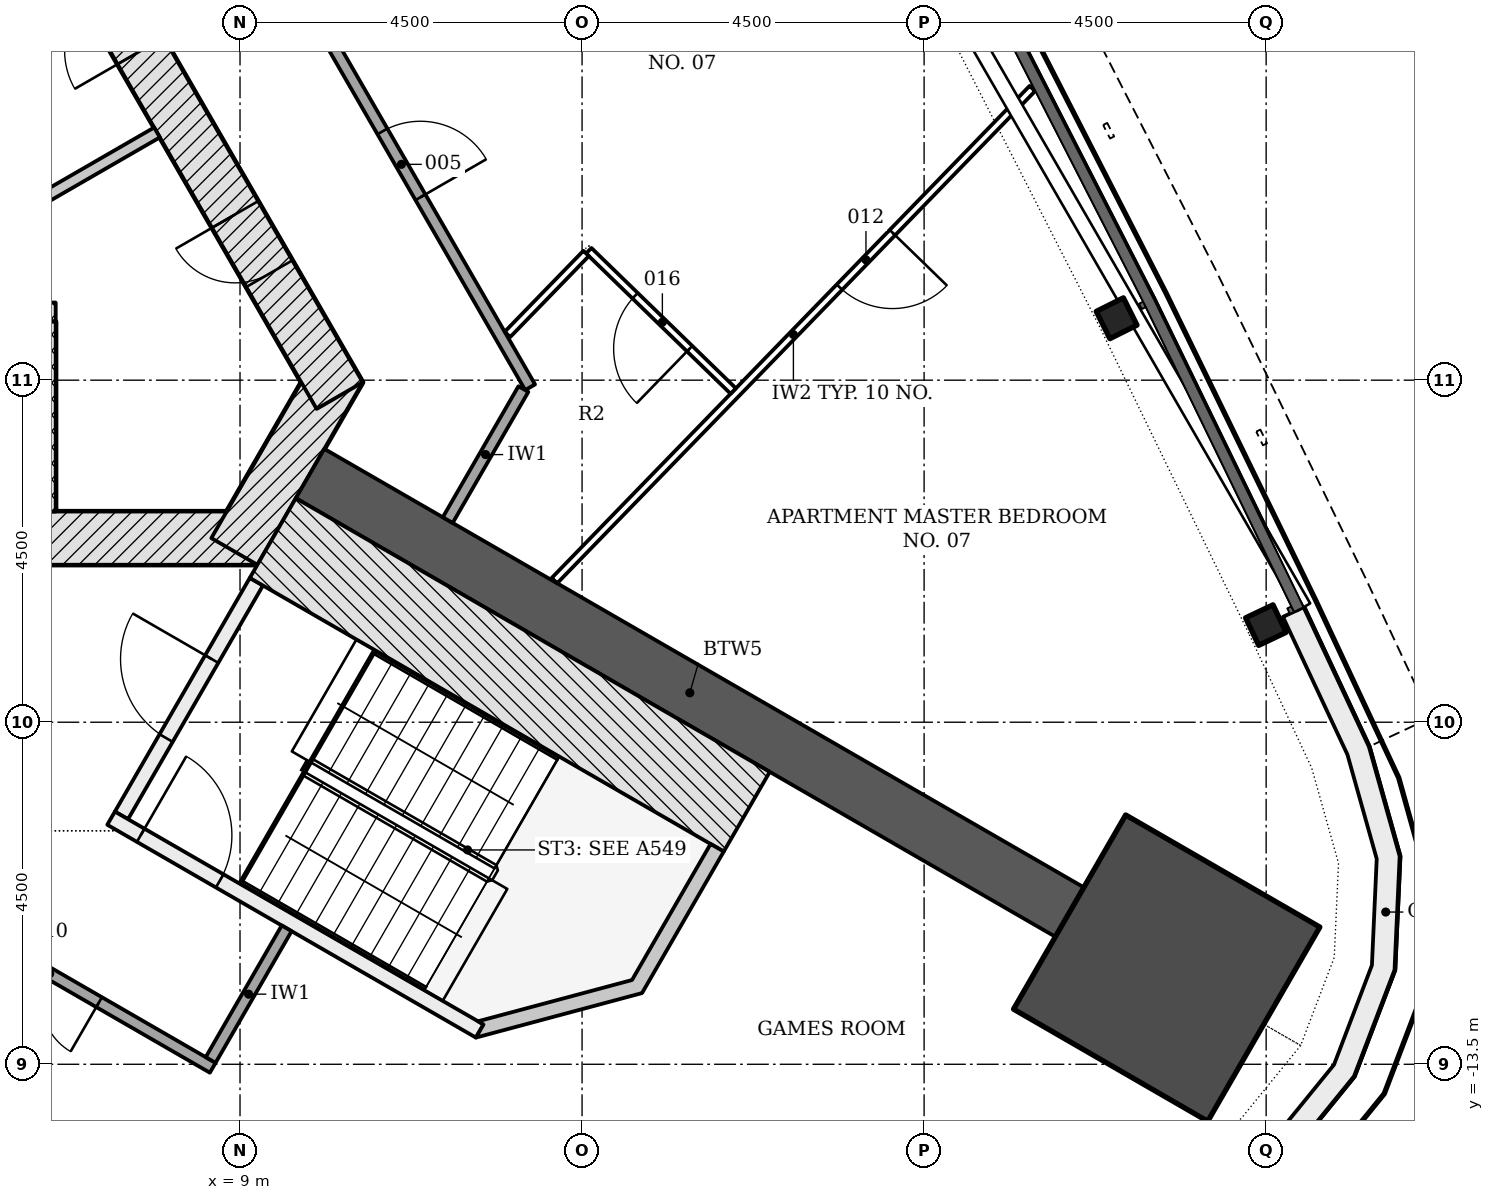
"""IFC4 building model, lengths in metres.
Left out: names, types, materials, properties, quantities, classifications, styles, units other than length and angle.
Written with IfcOpenShell. Run it as: python <this file> out.ifc"""

import sys

from ifc_helpers import new_model, si_unit, direction, frame, frame_2d, origin, origin_2d, place, context, subcontext, project, spatial, polyline, rectangle, i_section, outline, extrude, element, fill, save


model = new_model("IFC4")
c1 = context("Model", 3, precision=1e-05, world=origin(), true_north=direction((0.0, 1.0)))
c2 = subcontext(c1, "Body", "Model", "MODEL_VIEW")
j1 = project(units=[si_unit("LENGTHUNIT", "METRE"), si_unit("PLANEANGLEUNIT", "RADIAN")], contexts=[c1])
p1 = place(None, origin())
s1 = spatial("IfcSite", under=j1, at=p1, CompositionType="ELEMENT")
p2 = place(p1, origin())
s2 = spatial("IfcBuilding", under=s1, at=p2, CompositionType="ELEMENT")
p3 = place(p2, frame((0.0, 0.0, 116.7)))
s3 = spatial("IfcBuildingStorey", under=s2, at=p3, CompositionType="ELEMENT", Elevation=116.7)
p4 = place(p3, frame((-9.229, -6.578, -0.2), z_axis=(0.0, 0.0, 1.0), x_axis=(1.0, 0.0, 0.0)))
e1 = element("IfcWall", 1, at=p4, inside=s3, PredefinedType="SHEAR", context=c2, shape_type="SweptSolid", body=[
    extrude(rectangle(XDim=18.458, YDim=0.7, at=frame_2d((9.229, 0.0))), origin(), (0.0, 0.0, 1.0), 3.6),
])
p5 = place(p4, frame((3.304, 0.0, 0.2)))
e2 = element("IfcOpeningElement", 2, at=p5, cuts=e1, PredefinedType="OPENING", context=c2, shape_type="SweptSolid", body=[
    extrude(rectangle(XDim=1.1, YDim=2.1, at=frame_2d((0.55, 1.05))), frame((0.0, 0.36, 0.0), z_axis=(0.0, -1.0, 0.0), x_axis=(1.0, 0.0, 0.0)), (0.0, 0.0, 1.0), 0.72),
])
p6 = place(p4, frame((5.454, 0.0, 0.2)))
e3 = element("IfcOpeningElement", 3, at=p6, cuts=e1, PredefinedType="OPENING", context=c2, shape_type="SweptSolid", body=[
    extrude(rectangle(XDim=1.1, YDim=2.1, at=frame_2d((0.55, 1.05))), frame((0.0, 0.36, 0.0), z_axis=(0.0, -1.0, 0.0), x_axis=(1.0, 0.0, 0.0)), (0.0, 0.0, 1.0), 0.72),
])
p7 = place(p4, frame((7.604, 0.0, 0.2)))
e4 = element("IfcOpeningElement", 4, at=p7, cuts=e1, PredefinedType="OPENING", context=c2, shape_type="SweptSolid", body=[
    extrude(rectangle(XDim=1.1, YDim=2.1, at=frame_2d((0.55, 1.05))), frame((0.0, 0.36, 0.0), z_axis=(0.0, -1.0, 0.0), x_axis=(1.0, 0.0, 0.0)), (0.0, 0.0, 1.0), 0.72),
])
p8 = place(p4, frame((9.754, 0.0, 0.2)))
e5 = element("IfcOpeningElement", 5, at=p8, cuts=e1, PredefinedType="OPENING", context=c2, shape_type="SweptSolid", body=[
    extrude(rectangle(XDim=1.1, YDim=2.1, at=frame_2d((0.55, 1.05))), frame((0.0, 0.36, 0.0), z_axis=(0.0, -1.0, 0.0), x_axis=(1.0, 0.0, 0.0)), (0.0, 0.0, 1.0), 0.72),
])
p9 = place(p4, frame((11.904, 0.0, 0.2)))
e6 = element("IfcOpeningElement", 6, at=p9, cuts=e1, PredefinedType="OPENING", context=c2, shape_type="SweptSolid", body=[
    extrude(rectangle(XDim=1.1, YDim=2.1, at=frame_2d((0.55, 1.05))), frame((0.0, 0.36, 0.0), z_axis=(0.0, -1.0, 0.0), x_axis=(1.0, 0.0, 0.0)), (0.0, 0.0, 1.0), 0.72),
])
p10 = place(p4, frame((14.054, 0.0, 0.2)))
e7 = element("IfcOpeningElement", 7, at=p10, cuts=e1, PredefinedType="OPENING", context=c2, shape_type="SweptSolid", body=[
    extrude(rectangle(XDim=1.1, YDim=2.1, at=frame_2d((0.55, 1.05))), frame((0.0, 0.36, 0.0), z_axis=(0.0, -1.0, 0.0), x_axis=(1.0, 0.0, 0.0)), (0.0, 0.0, 1.0), 0.72),
])
p11 = place(p4, frame((0.926, 0.0, 0.2)))
e8 = element("IfcOpeningElement", 8, at=p11, cuts=e1, PredefinedType="OPENING", context=c2, shape_type="SweptSolid", body=[
    extrude(rectangle(XDim=0.9, YDim=2.1, at=frame_2d((0.45, 1.05))), frame((0.0, 0.36, 0.0), z_axis=(0.0, -1.0, 0.0), x_axis=(1.0, 0.0, 0.0)), (0.0, 0.0, 1.0), 0.72),
])
p12 = place(p3, frame((8.926, -6.753, -0.2), z_axis=(0.0, 0.0, 1.0), x_axis=(0.500042739161, 0.866000726912, 0.0)))
e9 = element("IfcWall", 9, at=p12, inside=s3, PredefinedType="SHEAR", context=c2, shape_type="SweptSolid", body=[
    extrude(rectangle(XDim=2.771, YDim=0.7, at=frame_2d((1.386, 0.0))), origin(), (0.0, 0.0, 1.0), 3.6),
])
p13 = place(p3, frame((10.311, -4.703, -0.2), z_axis=(0.0, 0.0, 1.0), x_axis=(-0.500001446645, 0.866024568562, 0.0)))
e10 = element("IfcWall", 10, at=p13, inside=s3, PredefinedType="SHEAR", context=c2, shape_type="SweptSolid", body=[
    extrude(rectangle(XDim=18.458, YDim=0.7, at=frame_2d((9.229, 0.0))), origin(), (0.0, 0.0, 1.0), 3.6),
])
p14 = place(p13, frame((7.5, 0.0, 0.2)))
e11 = element("IfcOpeningElement", 11, at=p14, cuts=e10, PredefinedType="OPENING", context=c2, shape_type="SweptSolid", body=[
    extrude(rectangle(XDim=1.0, YDim=2.1, at=frame_2d((0.5, 1.05))), frame((0.0, 0.36, 0.0), z_axis=(0.0, -1.0, 0.0), x_axis=(1.0, 0.0, 0.0)), (0.0, 0.0, 1.0), 0.72),
])
p15 = place(p13, frame((1.852, 0.0, 0.2)))
e12 = element("IfcOpeningElement", 12, at=p15, cuts=e10, PredefinedType="OPENING", context=c2, shape_type="SweptSolid", body=[
    extrude(rectangle(XDim=0.9, YDim=2.1, at=frame_2d((0.45, 1.05))), frame((0.0, 0.36, 0.0), z_axis=(0.0, -1.0, 0.0), x_axis=(1.0, 0.0, 0.0)), (0.0, 0.0, 1.0), 0.72),
])
p16 = place(p13, frame((5.238, 0.0, 0.2)))
e13 = element("IfcOpeningElement", 13, at=p16, cuts=e10, PredefinedType="OPENING", context=c2, shape_type="SweptSolid", body=[
    extrude(rectangle(XDim=1.0, YDim=2.1, at=frame_2d((0.5, 1.05))), frame((0.0, 0.36, 0.0), z_axis=(0.0, -1.0, 0.0), x_axis=(1.0, 0.0, 0.0)), (0.0, 0.0, 1.0), 0.72),
])
p17 = place(p13, frame((13.63, 0.0, 0.2)))
e14 = element("IfcOpeningElement", 14, at=p17, cuts=e10, PredefinedType="OPENING", context=c2, shape_type="SweptSolid", body=[
    extrude(rectangle(XDim=0.9, YDim=2.1, at=frame_2d((0.45, 1.05))), frame((0.0, 0.36, 0.0), z_axis=(0.0, -1.0, 0.0), x_axis=(1.0, 0.0, 0.0)), (0.0, 0.0, 1.0), 0.72),
])
p18 = place(p3, frame((9.922, -5.728, -0.2), z_axis=(0.0, 0.0, 1.0), x_axis=(0.866024913782, -0.500000848707, 0.0)))
e15 = element("IfcWall", 15, at=p18, inside=s3, PredefinedType="SHEAR", context=c2, shape_type="SweptSolid", body=[
    extrude(rectangle(XDim=11.539, YDim=0.75, at=frame_2d((5.769, 0.0))), origin(), (0.0, 0.0, 1.0), 3.6),
])
p19 = place(p3, frame((21.192, -12.235, -0.2), z_axis=(0.0, 0.0, 1.0), x_axis=(0.866025403784, -0.5, 0.0)))
e16 = element("IfcColumn", 16, at=p19, inside=s3, PredefinedType="COLUMN", context=c2, shape_type="SweptSolid", body=[
    extrude(rectangle(XDim=2.95, YDim=2.95, at=origin_2d()), origin(), (0.0, 0.0, 1.0), 3.6),
])
for number, where, z_axis, x_axis in (
    (17, (22.496, -7.722, -0.2), (0.0, 0.0, 1.0), (-0.428, 0.904, 0.0)),
    (18, (20.533, -3.686, -0.2), (0.0, 0.0, 1.0), (-0.446, 0.895, 0.0)),
):
    element("IfcColumn", number, at=place(p3, frame(where, z_axis=z_axis, x_axis=x_axis)), inside=s3, PredefinedType="COLUMN", context=c2, shape_type="SweptSolid", body=[
        extrude(i_section(OverallWidth=0.401, OverallDepth=0.399, WebThickness=0.025, FlangeThickness=0.04, FilletRadius=0.015, at=origin_2d()), origin(), (0.0, 0.0, 1.0), 3.6),
    ])
p20 = place(p3, origin())
e19 = element("IfcWall", 19, at=p20, inside=s3, PredefinedType="NOTDEFINED", context=c2, shape_type="SweptSolid", body=[
    extrude(outline(polyline([(17.98, -16.169), (19.999, -15.995), (21.449, -15.625), (22.711, -14.819), (23.656, -13.658), (24.189, -12.259), (24.257, -10.763), (23.852, -9.322), (22.993, -7.487), (22.721, -7.614), (23.57, -9.426), (23.955, -10.798), (23.891, -12.197), (23.393, -13.506), (22.509, -14.592), (21.328, -15.347), (19.948, -15.699), (17.955, -15.87), (17.98, -16.169)])), origin(), (0.0, 0.0, 1.0), 3.3),
])
p21 = place(p3, frame((6.45, -6.228, -0.2), z_axis=(0.0, 0.0, 1.0), x_axis=(0.0, 1.0, 0.0)))
e20 = element("IfcWall", 20, at=p21, inside=s3, PredefinedType="PARTITIONING", context=c2, shape_type="SweptSolid", body=[
    extrude(rectangle(XDim=2.5, YDim=0.25, at=frame_2d((1.25, 0.0))), origin(), (0.0, 0.0, 1.0), 3.6),
])
p22 = place(p3, frame((-6.575, -3.603, 0.0), z_axis=(0.0, 0.0, 1.0), x_axis=(1.0, 0.0, 0.0)))
e21 = element("IfcWall", 21, at=p22, inside=s3, PredefinedType="PARTITIONING", context=c2, shape_type="SweptSolid", body=[
    extrude(rectangle(XDim=13.15, YDim=0.25, at=frame_2d((6.575, 0.0))), origin(), (0.0, 0.0, 1.0), 3.4),
])
p23 = place(p3, frame((5.375, -2.703, 0.0), z_axis=(0.0, 0.0, 1.0), x_axis=(0.866046596414, 0.499963291492, 0.0)))
e22 = element("IfcWall", 22, at=p23, inside=s3, PredefinedType="PARTITIONING", context=c2, shape_type="SweptSolid", body=[
    extrude(rectangle(XDim=2.925, YDim=0.15, at=frame_2d((1.462, 0.0))), origin(), (0.0, 0.0, 1.0), 3.4),
])
p24 = place(p3, frame((7.44, -10.226, -0.2), z_axis=(0.0, 0.0, 1.0), x_axis=(0.500022077904, 0.866012656725, 0.0)))
e23 = element("IfcWall", 23, at=p24, inside=s3, PredefinedType="SHEAR", context=c2, shape_type="SweptSolid", body=[
    extrude(rectangle(XDim=3.55, YDim=0.2, at=frame_2d((1.775, 0.0))), origin(), (0.0, 0.0, 1.0), 3.6),
])
p25 = place(p24, frame((1.175, 0.0, 0.2)))
e24 = element("IfcOpeningElement", 24, at=p25, cuts=e23, PredefinedType="OPENING", context=c2, shape_type="SweptSolid", body=[
    extrude(rectangle(XDim=1.2, YDim=2.1, at=frame_2d((0.6, 1.05))), frame((0.0, 0.11, 0.0), z_axis=(0.0, -1.0, 0.0), x_axis=(1.0, 0.0, 0.0)), (0.0, 0.0, 1.0), 0.22),
])
p26 = place(p3, frame((7.304, -10.262, -0.2), z_axis=(0.0, 0.0, 1.0), x_axis=(0.866026594901, -0.49999793692, 0.0)))
e25 = element("IfcWall", 25, at=p26, inside=s3, PredefinedType="SHEAR", context=c2, shape_type="SweptSolid", body=[
    extrude(rectangle(XDim=5.6, YDim=0.2, at=frame_2d((2.8, 0.0))), origin(), (0.0, 0.0, 1.0), 3.6),
])
p27 = place(p26, frame((0.45, 0.0, 0.2)))
e26 = element("IfcOpeningElement", 26, at=p27, cuts=e25, PredefinedType="OPENING", context=c2, shape_type="SweptSolid", body=[
    extrude(rectangle(XDim=1.2, YDim=2.1, at=frame_2d((0.6, 1.05))), frame((0.0, 0.11, 0.0), z_axis=(0.0, -1.0, 0.0), x_axis=(1.0, 0.0, 0.0)), (0.0, 0.0, 1.0), 0.22),
])
p28 = place(p3, frame((9.431, -6.577, -0.2), z_axis=(0.0, 0.0, 1.0), x_axis=(0.866018442252, -0.500012057535, 0.0)))
e27 = element("IfcWall", 27, at=p28, inside=s3, PredefinedType="SHEAR", context=c2, shape_type="SweptSolid", body=[
    extrude(rectangle(XDim=7.2, YDim=1.211, at=frame_2d((3.6, 0.0))), origin(), (0.0, 0.0, 1.0), 3.6),
])
p29 = place(p3, frame((0.0, 0.0, -0.2)))
e28 = element("IfcWall", 28, at=p29, inside=s3, PredefinedType="SHEAR", context=c2, shape_type="SweptSolid", body=[
    extrude(outline(polyline([(12.104, -13.149), (14.289, -12.563), (15.364, -10.701), (15.191, -10.601), (14.157, -12.392), (12.132, -12.934), (12.204, -12.976), (12.204, -12.976), (12.204, -12.976), (12.204, -12.976), (12.204, -12.976), (12.204, -12.976), (12.204, -12.976), (12.204, -12.976), (12.204, -12.976), (12.204, -12.976), (12.204, -12.976), (12.204, -12.976), (12.204, -12.976), (12.204, -12.976), (12.204, -12.976), (12.204, -12.976), (12.204, -12.976), (12.104, -13.149)])), origin(), (0.0, 0.0, 1.0), 3.6),
])
p30 = place(p3, frame((5.289, 8.446, 0.0), z_axis=(0.0, 0.0, 1.0), x_axis=(0.499996620721, -0.866027354803, 0.0)))
e29 = element("IfcWall", 29, at=p30, inside=s3, PredefinedType="PARTITIONING", context=c2, shape_type="SweptSolid", body=[
    extrude(rectangle(XDim=15.057, YDim=0.15, at=frame_2d((7.528, 0.0))), origin(), (0.0, 0.0, 1.0), 2.847),
])
p31 = place(p30, frame((11.17, 0.0, 0.0)))
e30 = element("IfcOpeningElement", 30, at=p31, cuts=e29, PredefinedType="OPENING", context=c2, shape_type="SweptSolid", body=[
    extrude(rectangle(XDim=1.0, YDim=2.1, at=frame_2d((0.5, 1.05))), frame((0.0, 0.085, 0.0), z_axis=(0.0, -1.0, 0.0), x_axis=(1.0, 0.0, 0.0)), (0.0, 0.0, 1.0), 0.17),
])
p32 = place(p30, frame((4.736, 0.0, 0.0)))
e31 = element("IfcOpeningElement", 31, at=p32, cuts=e29, PredefinedType="OPENING", context=c2, shape_type="SweptSolid", body=[
    extrude(rectangle(XDim=1.0, YDim=2.1, at=frame_2d((0.5, 1.05))), frame((0.0, 0.085, 0.0), z_axis=(0.0, -1.0, 0.0), x_axis=(1.0, 0.0, 0.0)), (0.0, 0.0, 1.0), 0.17),
])
p33 = place(p3, frame((8.641, -13.546, 0.0), z_axis=(0.0, 0.0, 1.0), x_axis=(-0.866042728627, 0.499969991291, 0.0)))
e32 = element("IfcWall", 32, at=p33, inside=s3, PredefinedType="PARTITIONING", context=c2, shape_type="SweptSolid", body=[
    extrude(rectangle(XDim=5.805, YDim=0.15, at=frame_2d((2.903, 0.0))), origin(), (0.0, 0.0, 1.0), 2.847),
])
p34 = place(p33, frame((1.726, 0.0, 0.0)))
e33 = element("IfcOpeningElement", 33, at=p34, cuts=e32, PredefinedType="OPENING", context=c2, shape_type="SweptSolid", body=[
    extrude(rectangle(XDim=1.5, YDim=2.1, at=frame_2d((0.75, 1.05))), frame((0.0, 0.085, 0.0), z_axis=(0.0, -1.0, 0.0), x_axis=(1.0, 0.0, 0.0)), (0.0, 0.0, 1.0), 0.17),
])
p35 = place(p3, frame((11.733, -6.341, 0.0), z_axis=(0.0, 0.0, 1.0), x_axis=(0.50003033167, 0.866007891078, 0.0)))
e34 = element("IfcWall", 34, at=p35, inside=s3, PredefinedType="PARTITIONING", context=c2, shape_type="SweptSolid", body=[
    extrude(rectangle(XDim=1.991, YDim=0.15, at=frame_2d((0.995, 0.0))), origin(), (0.0, 0.0, 1.0), 3.4),
])
p36 = place(p3, frame((8.614, -13.444, 0.0), z_axis=(0.0, 0.0, 1.0), x_axis=(0.499972520799, 0.866041268327, 0.0)))
e35 = element("IfcWall", 35, at=p36, inside=s3, PredefinedType="PARTITIONING", context=c2, shape_type="SweptSolid", body=[
    extrude(rectangle(XDim=2.0, YDim=0.15, at=frame_2d((1.0, 0.0))), origin(), (0.0, 0.0, 1.0), 2.923),
])
p37 = place(p3, frame((19.425, -0.662, 0.0), z_axis=(0.0, 0.0, 1.0), x_axis=(-0.696698602336, -0.717363964458, 0.0)))
e36 = element("IfcWall", 36, at=p37, inside=s3, PredefinedType="PARTITIONING", context=c2, shape_type="SweptSolid", body=[
    extrude(rectangle(XDim=9.026, YDim=0.1, at=frame_2d((4.513, 0.0))), origin(), (0.0, 0.0, 1.0), 2.974),
])
p38 = place(p37, frame((2.643, 0.0, 0.0)))
e37 = element("IfcOpeningElement", 37, at=p38, cuts=e36, PredefinedType="OPENING", context=c2, shape_type="SweptSolid", body=[
    extrude(rectangle(XDim=1.0, YDim=2.1, at=frame_2d((0.5, 1.05))), frame((0.0, 0.06, 0.0), z_axis=(0.0, -1.0, 0.0), x_axis=(1.0, 0.0, 0.0)), (0.0, 0.0, 1.0), 0.12),
])
p39 = place(p3, frame((15.489, -4.643, 0.0), z_axis=(0.0, 0.0, 1.0), x_axis=(-0.717350421595, 0.696712546635, 0.0)))
e38 = element("IfcWall", 38, at=p39, inside=s3, PredefinedType="PARTITIONING", context=c2, shape_type="SweptSolid", body=[
    extrude(rectangle(XDim=2.65, YDim=0.1, at=frame_2d((1.325, 0.0))), origin(), (0.0, 0.0, 1.0), 3.4),
])
p40 = place(p39, frame((0.8, 0.0, 0.0)))
e39 = element("IfcOpeningElement", 39, at=p40, cuts=e38, PredefinedType="OPENING", context=c2, shape_type="SweptSolid", body=[
    extrude(rectangle(XDim=1.0, YDim=2.1, at=frame_2d((0.5, 1.05))), frame((0.0, 0.06, 0.0), z_axis=(0.0, -1.0, 0.0), x_axis=(1.0, 0.0, 0.0)), (0.0, 0.0, 1.0), 0.12),
])
p41 = place(p3, frame((12.518, -3.898, 0.0), z_axis=(0.0, 0.0, 1.0), x_axis=(0.69667940227, 0.717382610922, 0.0)))
e40 = element("IfcWall", 40, at=p41, inside=s3, PredefinedType="PARTITIONING", context=c2, shape_type="SweptSolid", body=[
    extrude(rectangle(XDim=1.486, YDim=0.1, at=frame_2d((0.743, 0.0))), origin(), (0.0, 0.0, 1.0), 3.4),
])
p42 = place(p15, origin())
e41 = element("IfcDoor", 41, at=p42, inside=s3, OperationType="SINGLE_SWING_RIGHT", PredefinedType="DOOR", context=c2, shape_type="SweptSolid", body=[
    extrude(rectangle(XDim=0.9, YDim=2.1, at=frame_2d((0.45, 1.05))), frame((0.0, 0.075, 0.0), z_axis=(0.0, -1.0, 0.0), x_axis=(1.0, 0.0, 0.0)), (0.0, 0.0, 1.0), 0.15),
])
fill(e12, e41)
p43 = place(p16, origin())
e42 = element("IfcDoor", 42, at=p43, inside=s3, OperationType="SINGLE_SWING_LEFT", PredefinedType="DOOR", context=c2, shape_type="SweptSolid", body=[
    extrude(rectangle(XDim=1.0, YDim=2.1, at=frame_2d((0.5, 1.05))), frame((0.0, 0.075, 0.0), z_axis=(0.0, -1.0, 0.0), x_axis=(1.0, 0.0, 0.0)), (0.0, 0.0, 1.0), 0.15),
])
fill(e13, e42)
p44 = place(p25, origin())
e43 = element("IfcDoor", 43, at=p44, inside=s3, OperationType="SINGLE_SWING_RIGHT", PredefinedType="DOOR", context=c2, shape_type="SweptSolid", body=[
    extrude(rectangle(XDim=1.2, YDim=2.1, at=frame_2d((0.6, 1.05))), frame((0.0, 0.025, 0.0), z_axis=(0.0, -1.0, 0.0), x_axis=(1.0, 0.0, 0.0)), (0.0, 0.0, 1.0), 0.05),
])
fill(e24, e43)
p45 = place(p27, origin())
e44 = element("IfcDoor", 44, at=p45, inside=s3, OperationType="SINGLE_SWING_LEFT", PredefinedType="DOOR", context=c2, shape_type="SweptSolid", body=[
    extrude(rectangle(XDim=1.2, YDim=2.1, at=frame_2d((0.6, 1.05))), frame((0.0, 0.025, 0.0), z_axis=(0.0, -1.0, 0.0), x_axis=(1.0, 0.0, 0.0)), (0.0, 0.0, 1.0), 0.05),
])
fill(e26, e44)
p46 = place(p31, origin())
e45 = element("IfcDoor", 45, at=p46, inside=s3, OperationType="SINGLE_SWING_RIGHT", PredefinedType="DOOR", context=c2, shape_type="SweptSolid", body=[
    extrude(rectangle(XDim=1.0, YDim=2.1, at=frame_2d((0.5, 1.05))), frame((0.0, 0.025, 0.0), z_axis=(0.0, -1.0, 0.0), x_axis=(1.0, 0.0, 0.0)), (0.0, 0.0, 1.0), 0.05),
])
fill(e30, e45)
p47 = place(p34, origin())
e46 = element("IfcDoor", 46, at=p47, inside=s3, OperationType="DOUBLE_DOOR_SINGLE_SWING", PredefinedType="DOOR", context=c2, shape_type="SweptSolid", body=[
    extrude(rectangle(XDim=1.5, YDim=2.1, at=frame_2d((0.75, 1.05))), frame((0.0, 0.025, 0.0), z_axis=(0.0, -1.0, 0.0), x_axis=(1.0, 0.0, 0.0)), (0.0, 0.0, 1.0), 0.05),
])
fill(e33, e46)
p48 = place(p38, origin())
e47 = element("IfcDoor", 47, at=p48, inside=s3, OperationType="SINGLE_SWING_LEFT", PredefinedType="DOOR", context=c2, shape_type="SweptSolid", body=[
    extrude(rectangle(XDim=1.0, YDim=2.1, at=frame_2d((0.5, 1.05))), frame((0.0, 0.025, 0.0), z_axis=(0.0, -1.0, 0.0), x_axis=(1.0, 0.0, 0.0)), (0.0, 0.0, 1.0), 0.05),
])
fill(e37, e47)
p49 = place(p40, origin())
e48 = element("IfcDoor", 48, at=p49, inside=s3, OperationType="SINGLE_SWING_LEFT", PredefinedType="DOOR", context=c2, shape_type="SweptSolid", body=[
    extrude(rectangle(XDim=1.0, YDim=2.1, at=frame_2d((0.5, 1.05))), frame((0.0, 0.025, 0.0), z_axis=(0.0, -1.0, 0.0), x_axis=(1.0, 0.0, 0.0)), (0.0, 0.0, 1.0), 0.05),
])
fill(e39, e48)
save(model, sys.argv[1])
